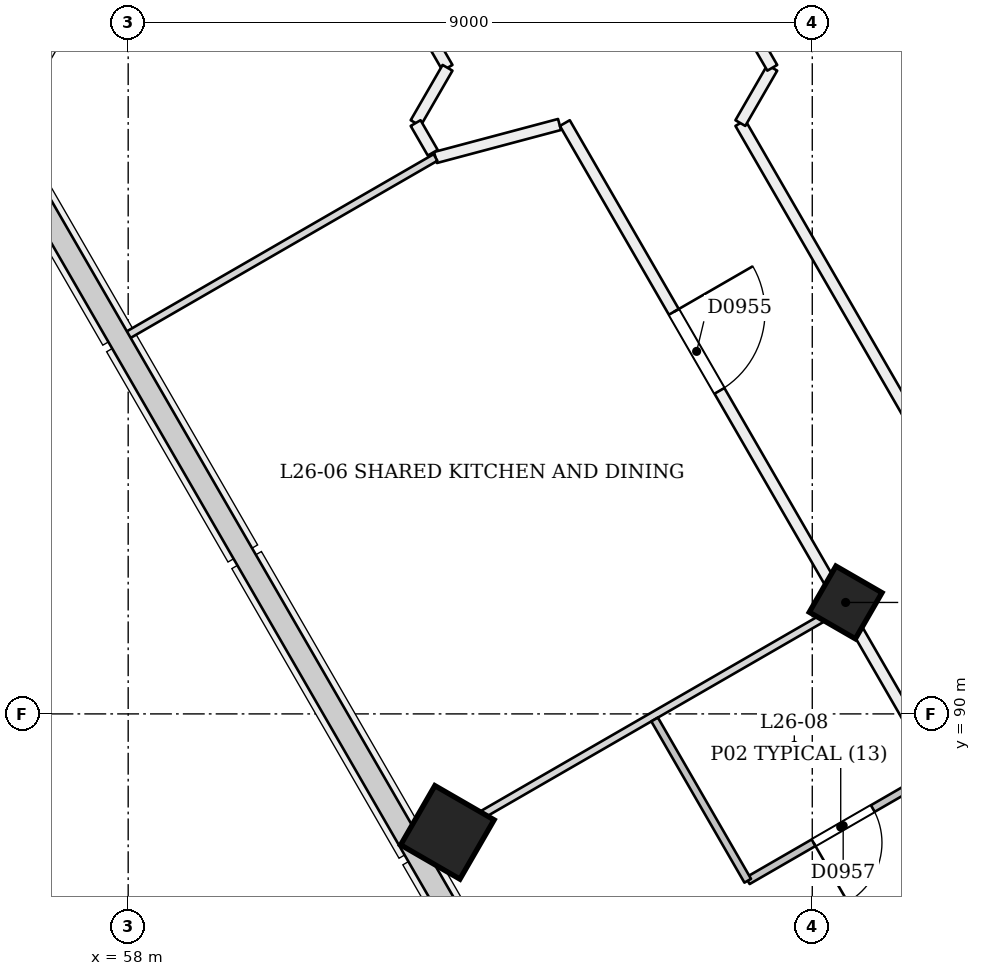
"""IFC4 building model, lengths in metres.
Left out: names, types, materials, properties, quantities, classifications, styles, units other than length and angle.
Written with IfcOpenShell. Run it as: python <this file> out.ifc"""

import sys

from ifc_helpers import new_model, si_unit, direction, frame, frame_2d, origin, origin_2d, place, context, subcontext, project, spatial, rectangle, extrude, element, fill, save


model = new_model("IFC4")
c1 = context("Model", 3, precision=1e-05, world=origin(), true_north=direction((0.0, 1.0)))
c2 = subcontext(c1, "Body", "Model", "MODEL_VIEW")
j1 = project(units=[si_unit("LENGTHUNIT", "METRE"), si_unit("PLANEANGLEUNIT", "RADIAN")], contexts=[c1])
p1 = place(None, origin())
s1 = spatial("IfcSite", under=j1, at=p1, CompositionType="ELEMENT")
p2 = place(p1, origin())
s2 = spatial("IfcBuilding", under=s1, at=p2, CompositionType="ELEMENT")
p3 = place(p2, frame((0.0, 0.0, 104.4)))
s3 = spatial("IfcBuildingStorey", under=s2, at=p3, CompositionType="ELEMENT", Elevation=104.4)
p4 = place(p3, frame((67.412, 91.419, -0.021), z_axis=(0.02222134892, 0.038480872521, 0.999012229206), x_axis=(-0.865639418776, -0.499186807044, 0.038482831667)))
e1 = element("IfcColumn", 1, at=p4, inside=s3, PredefinedType="COLUMN", context=c2, shape_type="SweptSolid", body=[
    extrude(rectangle(XDim=0.7, YDim=0.7, at=origin_2d()), origin(), (0.0, 0.0, 1.0), 3.604),
])
p5 = place(p3, frame((62.172, 88.394, -0.027), z_axis=(0.022222910879, 0.038415824599, 0.999014697916), x_axis=(-0.866018645871, -0.498532312818, 0.038434855016)))
e2 = element("IfcColumn", 2, at=p5, inside=s3, PredefinedType="COLUMN", context=c2, shape_type="SweptSolid", body=[
    extrude(rectangle(XDim=0.9, YDim=0.9, at=origin_2d()), origin(), (0.0, 0.0, 1.0), 3.604),
])
p6 = place(p3, frame((62.043, 97.32, 0.0), z_axis=(0.0, 0.0, 1.0), x_axis=(0.966383581826, 0.257104595015, 0.0)))
e3 = element("IfcWall", 3, at=p6, inside=s3, PredefinedType="PARTITIONING", context=c2, shape_type="SweptSolid", body=[
    extrude(rectangle(XDim=1.688, YDim=0.15, at=frame_2d((0.844, 0.0))), origin(), (0.0, 0.0, 1.0), 3.1),
])
p7 = place(p3, frame((63.745, 97.773, 0.0), z_axis=(0.0, 0.0, 1.0), x_axis=(0.500001045382, -0.866024800232, 0.0)))
e4 = element("IfcWall", 4, at=p7, inside=s3, PredefinedType="PARTITIONING", context=c2, shape_type="SweptSolid", body=[
    extrude(rectangle(XDim=41.671, YDim=0.15, at=frame_2d((20.836, 0.0))), origin(), (0.0, 0.0, 1.0), 2.7),
])
p8 = place(p7, frame((2.868, 0.0, 0.0)))
e5 = element("IfcOpeningElement", 5, at=p8, cuts=e4, PredefinedType="OPENING", context=c2, shape_type="SweptSolid", body=[
    extrude(rectangle(XDim=1.2, YDim=2.1, at=frame_2d((0.6, 1.05))), frame((0.0, 0.085, 0.0), z_axis=(0.0, -1.0, 0.0), x_axis=(1.0, 0.0, 0.0)), (0.0, 0.0, 1.0), 0.171),
])
p9 = place(p7, frame((10.115, 0.0, 0.0)))
e6 = element("IfcOpeningElement", 6, at=p9, cuts=e4, PredefinedType="OPENING", context=c2, shape_type="SweptSolid", body=[
    extrude(rectangle(XDim=1.0, YDim=2.1, at=frame_2d((0.5, 1.05))), frame((0.0, 0.085, 0.0), z_axis=(0.0, -1.0, 0.0), x_axis=(1.0, 0.0, 0.0)), (0.0, 0.0, 1.0), 0.171),
])
p10 = place(p7, frame((12.44, 0.0, 0.0)))
e7 = element("IfcOpeningElement", 7, at=p10, cuts=e4, PredefinedType="OPENING", context=c2, shape_type="SweptSolid", body=[
    extrude(rectangle(XDim=1.0, YDim=2.1, at=frame_2d((0.5, 1.05))), frame((0.0, 0.085, 0.0), z_axis=(0.0, -1.0, 0.0), x_axis=(1.0, 0.0, 0.0)), (0.0, 0.0, 1.0), 0.171),
])
p11 = place(p7, frame((19.231, 0.0, 0.0)))
e8 = element("IfcOpeningElement", 8, at=p11, cuts=e4, PredefinedType="OPENING", context=c2, shape_type="SweptSolid", body=[
    extrude(rectangle(XDim=1.0, YDim=2.1, at=frame_2d((0.5, 1.05))), frame((0.0, 0.085, 0.0), z_axis=(0.0, -1.0, 0.0), x_axis=(1.0, 0.0, 0.0)), (0.0, 0.0, 1.0), 0.171),
])
p12 = place(p7, frame((21.556, 0.0, 0.0)))
e9 = element("IfcOpeningElement", 9, at=p12, cuts=e4, PredefinedType="OPENING", context=c2, shape_type="SweptSolid", body=[
    extrude(rectangle(XDim=1.0, YDim=2.1, at=frame_2d((0.5, 1.05))), frame((0.0, 0.085, 0.0), z_axis=(0.0, -1.0, 0.0), x_axis=(1.0, 0.0, 0.0)), (0.0, 0.0, 1.0), 0.171),
])
p13 = place(p7, frame((27.086, 0.0, 0.0)))
e10 = element("IfcOpeningElement", 10, at=p13, cuts=e4, PredefinedType="OPENING", context=c2, shape_type="SweptSolid", body=[
    extrude(rectangle(XDim=1.0, YDim=2.1, at=frame_2d((0.5, 1.05))), frame((0.0, 0.085, 0.0), z_axis=(0.0, -1.0, 0.0), x_axis=(1.0, 0.0, 0.0)), (0.0, 0.0, 1.0), 0.171),
])
p14 = place(p7, frame((30.44, 0.0, 0.0)))
e11 = element("IfcOpeningElement", 11, at=p14, cuts=e4, PredefinedType="OPENING", context=c2, shape_type="SweptSolid", body=[
    extrude(rectangle(XDim=1.0, YDim=2.1, at=frame_2d((0.5, 1.05))), frame((0.0, 0.085, 0.0), z_axis=(0.0, -1.0, 0.0), x_axis=(1.0, 0.0, 0.0)), (0.0, 0.0, 1.0), 0.171),
])
p15 = place(p7, frame((37.619, 0.0, 0.0)))
e12 = element("IfcOpeningElement", 12, at=p15, cuts=e4, PredefinedType="OPENING", context=c2, shape_type="SweptSolid", body=[
    extrude(rectangle(XDim=1.2, YDim=2.1, at=frame_2d((0.6, 1.05))), frame((0.0, 0.085, 0.0), z_axis=(0.0, -1.0, 0.0), x_axis=(1.0, 0.0, 0.0)), (0.0, 0.0, 1.0), 0.171),
])
p16 = place(p3, frame((69.156, 92.4, 0.0), z_axis=(0.0, 0.0, 1.0), x_axis=(-0.499990416364, 0.866030936828, 0.0)))
e13 = element("IfcWall", 13, at=p16, inside=s3, PredefinedType="PARTITIONING", context=c2, shape_type="SweptSolid", body=[
    extrude(rectangle(XDim=6.204, YDim=0.15, at=frame_2d((3.102, 0.0))), origin(), (0.0, 0.0, 1.0), 3.1),
])
p17 = place(p3, frame((66.054, 97.773, 0.0), z_axis=(0.0, 0.0, 1.0), x_axis=(0.500141944548, 0.86594343655, 0.0)))
e14 = element("IfcWall", 14, at=p17, inside=s3, PredefinedType="PARTITIONING", context=c2, shape_type="SweptSolid", body=[
    extrude(rectangle(XDim=0.84, YDim=0.15, at=frame_2d((0.42, 0.0))), origin(), (0.0, 0.0, 1.0), 3.1),
])
p18 = place(p3, frame((66.474, 98.5, 0.0), z_axis=(0.0, 0.0, 1.0), x_axis=(-0.500027479704, 0.866009537788, 0.0)))
e15 = element("IfcWall", 15, at=p18, inside=s3, PredefinedType="PARTITIONING", context=c2, shape_type="SweptSolid", body=[
    extrude(rectangle(XDim=2.309, YDim=0.15, at=frame_2d((1.155, 0.0))), origin(), (0.0, 0.0, 1.0), 3.1),
])
p19 = place(p3, frame((61.265, 100.122, 0.0), z_axis=(0.0, 0.0, 1.0), x_axis=(0.499951854219, -0.86605319898, 0.0)))
e16 = element("IfcWall", 16, at=p19, inside=s3, PredefinedType="PARTITIONING", context=c2, shape_type="SweptSolid", body=[
    extrude(rectangle(XDim=1.873, YDim=0.15, at=frame_2d((0.937, 0.0))), origin(), (0.0, 0.0, 1.0), 3.1),
])
p20 = place(p3, frame((62.201, 98.5, 0.0), z_axis=(0.0, 0.0, 1.0), x_axis=(-0.499923853111, -0.866069362748, 0.0)))
e17 = element("IfcWall", 17, at=p20, inside=s3, PredefinedType="PARTITIONING", context=c2, shape_type="SweptSolid", body=[
    extrude(rectangle(XDim=0.84, YDim=0.15, at=frame_2d((0.42, 0.0))), origin(), (0.0, 0.0, 1.0), 3.1),
])
p21 = place(p3, frame((61.782, 97.773, 0.0), z_axis=(0.0, 0.0, 1.0), x_axis=(0.499753735824, -0.866167537795, 0.0)))
e18 = element("IfcWall", 18, at=p21, inside=s3, PredefinedType="PARTITIONING", context=c2, shape_type="SweptSolid", body=[
    extrude(rectangle(XDim=0.45, YDim=0.15, at=frame_2d((0.225, 0.0))), origin(), (0.0, 0.0, 1.0), 3.1),
])
p22 = place(p3, frame((61.87, 88.22, 0.0), z_axis=(0.0, 0.0, 1.0), x_axis=(0.866015887322, 0.500016482634, 0.0)))
e19 = element("IfcWall", 19, at=p22, inside=s3, PredefinedType="PARTITIONING", context=c2, shape_type="SweptSolid", body=[
    extrude(rectangle(XDim=6.325, YDim=0.1, at=frame_2d((3.163, 0.0))), origin(), (0.0, 0.0, 1.0), 2.6),
])
p23 = place(p3, frame((62.043, 97.32, 0.0), z_axis=(0.0, 0.0, 1.0), x_axis=(-0.866015897305, -0.500016465344, 0.0)))
e20 = element("IfcWall", 20, at=p23, inside=s3, PredefinedType="PARTITIONING", context=c2, shape_type="SweptSolid", body=[
    extrude(rectangle(XDim=4.72, YDim=0.1, at=frame_2d((2.36, 0.0))), origin(), (0.0, 0.0, 1.0), 2.6),
])
p24 = place(p3, frame((68.597, 89.218, 0.0), z_axis=(0.0, 0.0, 1.0), x_axis=(-0.866011447264, -0.500024172624, 0.0)))
e21 = element("IfcWall", 21, at=p24, inside=s3, PredefinedType="PARTITIONING", context=c2, shape_type="SweptSolid", body=[
    extrude(rectangle(XDim=2.825, YDim=0.1, at=frame_2d((1.413, 0.0))), origin(), (0.0, 0.0, 1.0), 3.1),
])
p25 = place(p24, frame((0.925, 0.0, 0.0)))
e22 = element("IfcOpeningElement", 22, at=p25, cuts=e21, PredefinedType="OPENING", context=c2, shape_type="SweptSolid", body=[
    extrude(rectangle(XDim=0.9, YDim=2.1, at=frame_2d((0.45, 1.05))), frame((0.0, 0.061, 0.0), z_axis=(0.0, -1.0, 0.0), x_axis=(1.0, 0.0, 0.0)), (0.0, 0.0, 1.0), 0.121),
])
p26 = place(p3, frame((66.151, 87.805, 0.0), z_axis=(0.0, 0.0, 1.0), x_axis=(-0.499943856944, 0.866057815567, 0.0)))
e23 = element("IfcWall", 23, at=p26, inside=s3, PredefinedType="PARTITIONING", context=c2, shape_type="SweptSolid", body=[
    extrude(rectangle(XDim=2.45, YDim=0.1, at=frame_2d((1.225, 0.0))), origin(), (0.0, 0.0, 1.0), 2.7),
])
p27 = place(p8, origin())
e24 = element("IfcDoor", 24, at=p27, inside=s3, OperationType="SINGLE_SWING_LEFT", PredefinedType="NOTDEFINED", context=c2, shape_type="SweptSolid", body=[
    extrude(rectangle(XDim=1.2, YDim=2.1, at=frame_2d((0.6, 1.05))), frame((0.0, 0.025, 0.0), z_axis=(0.0, -1.0, 0.0), x_axis=(1.0, 0.0, 0.0)), (0.0, 0.0, 1.0), 0.05),
])
fill(e5, e24)
p28 = place(p25, origin())
e25 = element("IfcDoor", 25, at=p28, inside=s3, OperationType="SINGLE_SWING_RIGHT", PredefinedType="NOTDEFINED", context=c2, shape_type="SweptSolid", body=[
    extrude(rectangle(XDim=0.9, YDim=2.1, at=frame_2d((0.45, 1.05))), frame((0.0, 0.025, 0.0), z_axis=(0.0, -1.0, 0.0), x_axis=(1.0, 0.0, 0.0)), (0.0, 0.0, 1.0), 0.05),
])
fill(e22, e25)
save(model, sys.argv[1])
